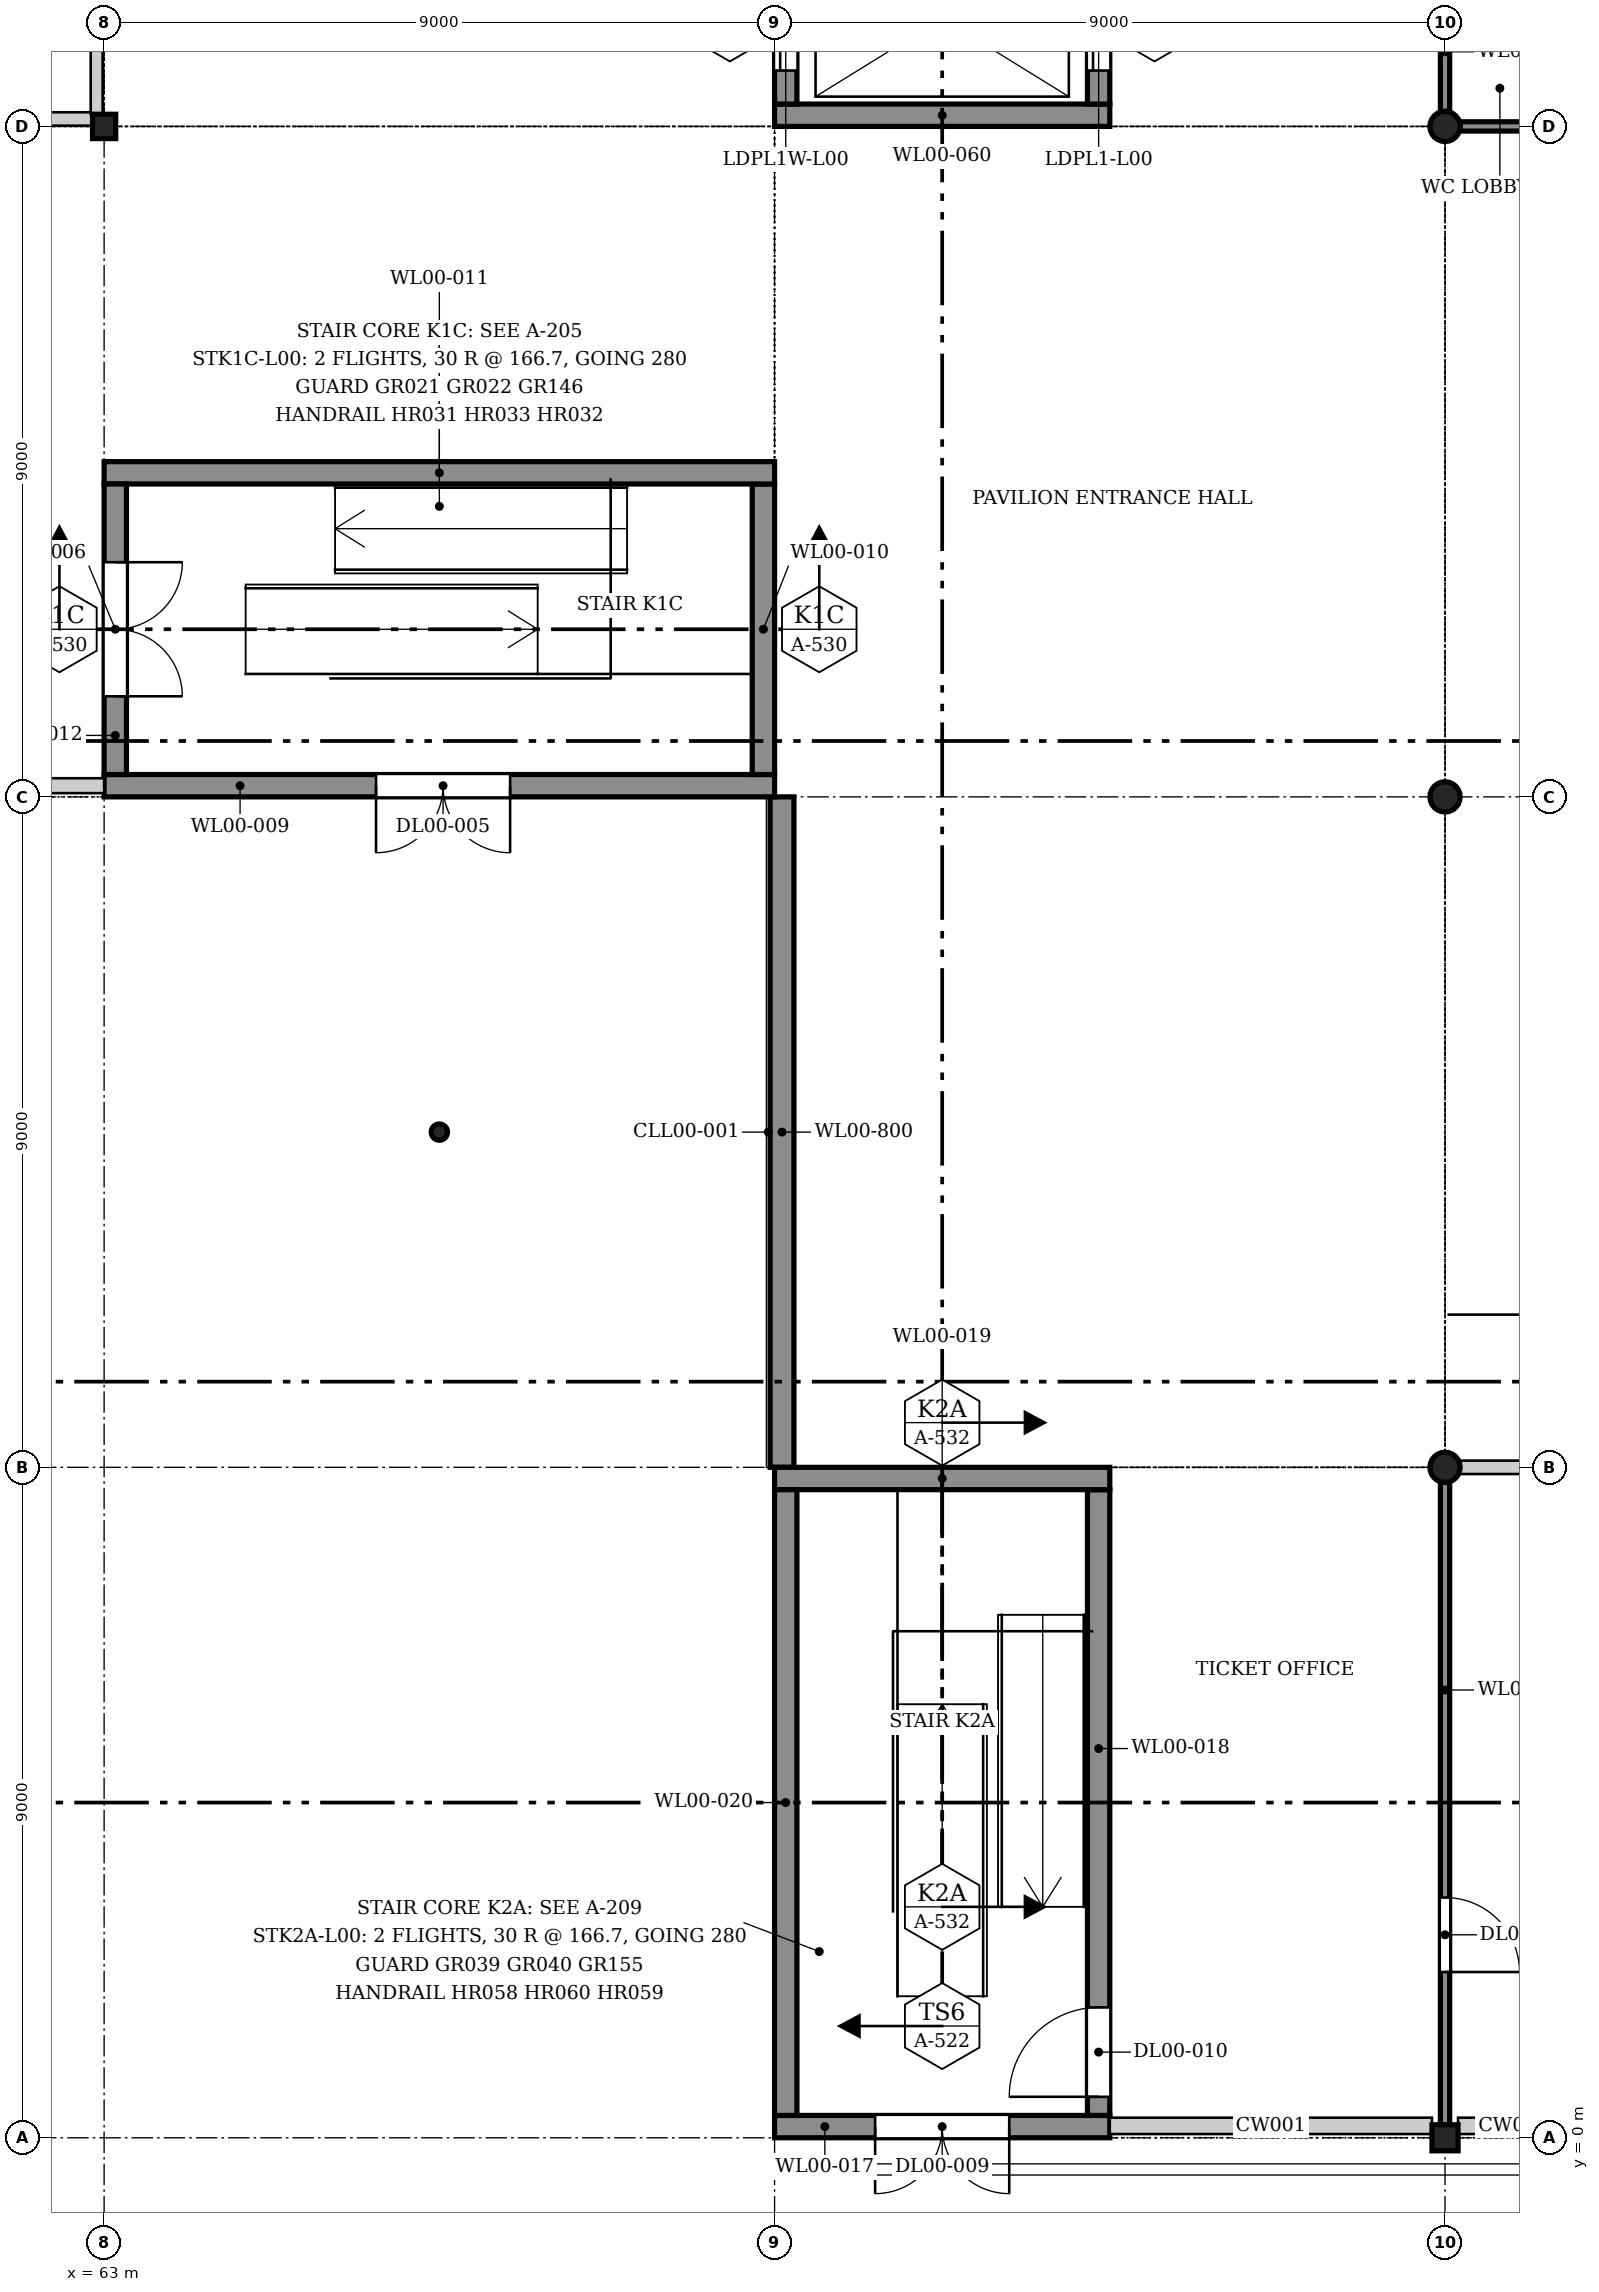
"""IFC4 building model, lengths in metres.
Left out: names, types, materials, properties, quantities, classifications, styles, units other than length and angle.
Written with IfcOpenShell. Run it as: python <this file> out.ifc"""

import sys

from ifc_helpers import new_model, si_unit, direction, frame, frame_2d, origin, origin_2d, place, context, subcontext, project, spatial, rectangle, hollow_rectangle, hollow_circle, i_section, extrude, element, fill, save


model = new_model("IFC4")
c1 = context("Model", 3, precision=1e-05, world=origin(), true_north=direction((0.0, 1.0)))
c2 = subcontext(c1, "Body", "Model", "MODEL_VIEW")
j1 = project(units=[si_unit("LENGTHUNIT", "METRE"), si_unit("PLANEANGLEUNIT", "RADIAN")], contexts=[c1])
p1 = place(None, origin())
s1 = spatial("IfcSite", under=j1, at=p1, CompositionType="ELEMENT")
p2 = place(p1, origin())
s2 = spatial("IfcBuilding", under=s1, at=p2, CompositionType="ELEMENT")
p3 = place(p2, origin())
s3 = spatial("IfcBuildingStorey", under=s2, at=p3, CompositionType="ELEMENT", Elevation=0.0)
p4 = place(p3, frame((81.0, 0.0, 0.0), z_axis=(0.0, 0.0, 1.0), x_axis=(1.0, 0.0, 0.0)))
e1 = element("IfcColumn", 1, at=p4, inside=s3, PredefinedType="COLUMN", context=c2, shape_type="SweptSolid", body=[
    extrude(hollow_rectangle(XDim=0.35, YDim=0.35, WallThickness=0.016, InnerFilletRadius=0.024, OuterFilletRadius=0.04, at=origin_2d()), origin(), (0.0, 0.0, 1.0), 5.0),
])
for number, where, z_axis, x_axis in (
    (2, (81.0, 9.0, 0.0), (0.0, 0.0, 1.0), (1.0, 0.0, 0.0)),
    (3, (81.0, 18.0, 0.0), (0.0, 0.0, 1.0), (1.0, 0.0, 0.0)),
):
    element("IfcColumn", number, at=place(p3, frame(where, z_axis=z_axis, x_axis=x_axis)), inside=s3, PredefinedType="COLUMN", context=c2, shape_type="SweptSolid", body=[
        extrude(hollow_circle(Radius=0.203, WallThickness=0.013, at=origin_2d()), origin(), (0.0, 0.0, 1.0), 5.0),
    ])
p5 = place(p3, frame((63.0, 27.0, 0.0), z_axis=(0.0, 0.0, 1.0), x_axis=(1.0, 0.0, 0.0)))
e4 = element("IfcColumn", 4, at=p5, inside=s3, PredefinedType="COLUMN", context=c2, shape_type="SweptSolid", body=[
    extrude(i_section(OverallWidth=0.311, OverallDepth=0.327, WebThickness=0.016, FlangeThickness=0.025, FilletRadius=0.017, at=origin_2d()), origin(), (0.0, 0.0, 1.0), 5.0),
])
p6 = place(p3, frame((81.0, 27.0, 0.0), z_axis=(0.0, 0.0, 1.0), x_axis=(1.0, 0.0, 0.0)))
e5 = element("IfcColumn", 5, at=p6, inside=s3, PredefinedType="COLUMN", context=c2, shape_type="SweptSolid", body=[
    extrude(hollow_circle(Radius=0.203, WallThickness=0.013, at=origin_2d()), origin(), (0.0, 0.0, 1.0), 5.0),
])
p7 = place(p3, frame((67.5, 13.5, -0.2), z_axis=(0.0, 0.0, 1.0), x_axis=(1.0, 0.0, 0.0)))
e6 = element("IfcColumn", 6, at=p7, inside=s3, PredefinedType="COLUMN", context=c2, shape_type="SweptSolid", body=[
    extrude(hollow_circle(Radius=0.11, WallThickness=0.008, at=origin_2d()), origin(), (0.0, 0.0, 1.0), 4.743),
])
p8 = place(p3, frame((72.1, 9.0, 0.0), z_axis=(0.0, 0.0, 1.0), x_axis=(0.0, 1.0, 0.0)))
e7 = element("IfcWall", 7, at=p8, inside=s3, PredefinedType="SOLIDWALL", context=c2, shape_type="SweptSolid", body=[
    extrude(rectangle(XDim=9.0, YDim=0.32, at=frame_2d((4.5, 0.0))), origin(), (0.0, 0.0, 1.0), 4.835),
])
p9 = place(p3, frame((63.0, 18.15, 0.0), z_axis=(0.0, 0.0, 1.0), x_axis=(1.0, 0.0, 0.0)))
e8 = element("IfcWall", 8, at=p9, inside=s3, PredefinedType="SOLIDWALL", context=c2, shape_type="SweptSolid", body=[
    extrude(rectangle(XDim=9.0, YDim=0.3, at=frame_2d((4.5, 0.0))), origin(), (0.0, 0.0, 1.0), 5.0),
])
p10 = place(p9, frame((3.65, 0.0, 0.0)))
e9 = element("IfcOpeningElement", 9, at=p10, cuts=e8, PredefinedType="OPENING", context=c2, shape_type="SweptSolid", body=[
    extrude(rectangle(XDim=1.8, YDim=2.1, at=frame_2d((0.9, 1.05))), frame((0.0, 0.16, 0.0), z_axis=(0.0, -1.0, 0.0), x_axis=(1.0, 0.0, 0.0)), (0.0, 0.0, 1.0), 0.32),
])
p11 = place(p3, frame((71.85, 18.3, 0.0), z_axis=(0.0, 0.0, 1.0), x_axis=(0.0, 1.0, 0.0)))
e10 = element("IfcWall", 10, at=p11, inside=s3, PredefinedType="SOLIDWALL", context=c2, shape_type="SweptSolid", body=[
    extrude(rectangle(XDim=3.9, YDim=0.3, at=frame_2d((1.95, 0.0))), origin(), (0.0, 0.0, 1.0), 5.0),
])
p12 = place(p3, frame((63.0, 22.35, 0.0), z_axis=(0.0, 0.0, 1.0), x_axis=(1.0, 0.0, 0.0)))
e11 = element("IfcWall", 11, at=p12, inside=s3, PredefinedType="SOLIDWALL", context=c2, shape_type="SweptSolid", body=[
    extrude(rectangle(XDim=9.0, YDim=0.3, at=frame_2d((4.5, 0.0))), origin(), (0.0, 0.0, 1.0), 5.0),
])
p13 = place(p3, frame((63.15, 18.3, 0.0), z_axis=(0.0, 0.0, 1.0), x_axis=(0.0, 1.0, 0.0)))
e12 = element("IfcWall", 12, at=p13, inside=s3, PredefinedType="SOLIDWALL", context=c2, shape_type="SweptSolid", body=[
    extrude(rectangle(XDim=3.9, YDim=0.3, at=frame_2d((1.95, 0.0))), origin(), (0.0, 0.0, 1.0), 5.0),
])
p14 = place(p13, frame((1.05, 0.0, 0.0)))
e13 = element("IfcOpeningElement", 13, at=p14, cuts=e12, PredefinedType="OPENING", context=c2, shape_type="SweptSolid", body=[
    extrude(rectangle(XDim=1.8, YDim=2.1, at=frame_2d((0.9, 1.05))), frame((0.0, 0.16, 0.0), z_axis=(0.0, -1.0, 0.0), x_axis=(1.0, 0.0, 0.0)), (0.0, 0.0, 1.0), 0.32),
])
p15 = place(p3, frame((72.0, 0.15, 0.0), z_axis=(0.0, 0.0, 1.0), x_axis=(1.0, 0.0, 0.0)))
e14 = element("IfcWall", 14, at=p15, inside=s3, PredefinedType="SOLIDWALL", context=c2, shape_type="SweptSolid", body=[
    extrude(rectangle(XDim=4.5, YDim=0.3, at=frame_2d((2.25, 0.0))), origin(), (0.0, 0.0, 1.0), 5.0),
])
p16 = place(p15, frame((1.35, 0.0, 0.0)))
e15 = element("IfcOpeningElement", 15, at=p16, cuts=e14, PredefinedType="OPENING", context=c2, shape_type="SweptSolid", body=[
    extrude(rectangle(XDim=1.8, YDim=2.1, at=frame_2d((0.9, 1.05))), frame((0.0, 0.16, 0.0), z_axis=(0.0, -1.0, 0.0), x_axis=(1.0, 0.0, 0.0)), (0.0, 0.0, 1.0), 0.32),
])
p17 = place(p3, frame((76.35, 0.3, 0.0), z_axis=(0.0, 0.0, 1.0), x_axis=(0.0, 1.0, 0.0)))
e16 = element("IfcWall", 16, at=p17, inside=s3, PredefinedType="SOLIDWALL", context=c2, shape_type="SweptSolid", body=[
    extrude(rectangle(XDim=8.4, YDim=0.3, at=frame_2d((4.2, 0.0))), origin(), (0.0, 0.0, 1.0), 5.0),
])
p18 = place(p17, frame((0.25, 0.0, 0.0)))
e17 = element("IfcOpeningElement", 17, at=p18, cuts=e16, PredefinedType="OPENING", context=c2, shape_type="SweptSolid", body=[
    extrude(rectangle(XDim=1.2, YDim=2.1, at=frame_2d((0.6, 1.05))), frame((0.0, 0.16, 0.0), z_axis=(0.0, -1.0, 0.0), x_axis=(1.0, 0.0, 0.0)), (0.0, 0.0, 1.0), 0.32),
])
p19 = place(p3, frame((72.0, 8.85, 0.0), z_axis=(0.0, 0.0, 1.0), x_axis=(1.0, 0.0, 0.0)))
e18 = element("IfcWall", 18, at=p19, inside=s3, PredefinedType="SOLIDWALL", context=c2, shape_type="SweptSolid", body=[
    extrude(rectangle(XDim=4.5, YDim=0.3, at=frame_2d((2.25, 0.0))), origin(), (0.0, 0.0, 1.0), 5.0),
])
p20 = place(p3, frame((72.15, 0.3, 0.0), z_axis=(0.0, 0.0, 1.0), x_axis=(0.0, 1.0, 0.0)))
e19 = element("IfcWall", 19, at=p20, inside=s3, PredefinedType="SOLIDWALL", context=c2, shape_type="SweptSolid", body=[
    extrude(rectangle(XDim=8.4, YDim=0.3, at=frame_2d((4.2, 0.0))), origin(), (0.0, 0.0, 1.0), 5.0),
])
p21 = place(p3, frame((72.0, 27.15, 0.0), z_axis=(0.0, 0.0, 1.0), x_axis=(1.0, 0.0, 0.0)))
e20 = element("IfcWall", 20, at=p21, inside=s3, PredefinedType="SOLIDWALL", context=c2, shape_type="SweptSolid", body=[
    extrude(rectangle(XDim=4.5, YDim=0.3, at=frame_2d((2.25, 0.0))), origin(), (0.0, 0.0, 1.0), 5.0),
])
p22 = place(p3, frame((76.35, 27.3, 0.0), z_axis=(0.0, 0.0, 1.0), x_axis=(0.0, 1.0, 0.0)))
e21 = element("IfcWall", 21, at=p22, inside=s3, PredefinedType="SOLIDWALL", context=c2, shape_type="SweptSolid", body=[
    extrude(rectangle(XDim=8.4, YDim=0.3, at=frame_2d((4.2, 0.0))), origin(), (0.0, 0.0, 1.0), 5.0),
])
p23 = place(p22, frame((0.45, 0.0, 0.0)))
e22 = element("IfcOpeningElement", 22, at=p23, cuts=e21, PredefinedType="OPENING", context=c2, shape_type="SweptSolid", body=[
    extrude(rectangle(XDim=1.4, YDim=2.1, at=frame_2d((0.7, 1.05))), frame((0.0, 0.16, 0.0), z_axis=(0.0, -1.0, 0.0), x_axis=(1.0, 0.0, 0.0)), (0.0, 0.0, 1.0), 0.32),
])
p24 = place(p22, frame((4.925, 0.0, 0.0)))
e23 = element("IfcOpeningElement", 23, at=p24, cuts=e21, PredefinedType="OPENING", context=c2, shape_type="SweptSolid", body=[
    extrude(rectangle(XDim=1.0, YDim=2.1, at=frame_2d((0.5, 1.05))), frame((0.0, 0.16, 0.0), z_axis=(0.0, -1.0, 0.0), x_axis=(1.0, 0.0, 0.0)), (0.0, 0.0, 1.0), 0.32),
])
p25 = place(p3, frame((72.15, 27.3, 0.0), z_axis=(0.0, 0.0, 1.0), x_axis=(0.0, 1.0, 0.0)))
e24 = element("IfcWall", 24, at=p25, inside=s3, PredefinedType="SOLIDWALL", context=c2, shape_type="SweptSolid", body=[
    extrude(rectangle(XDim=8.4, YDim=0.3, at=frame_2d((4.2, 0.0))), origin(), (0.0, 0.0, 1.0), 5.0),
])
p26 = place(p25, frame((0.45, 0.0, 0.0)))
e25 = element("IfcOpeningElement", 25, at=p26, cuts=e24, PredefinedType="OPENING", context=c2, shape_type="SweptSolid", body=[
    extrude(rectangle(XDim=1.4, YDim=2.1, at=frame_2d((0.7, 1.05))), frame((0.0, 0.16, 0.0), z_axis=(0.0, -1.0, 0.0), x_axis=(1.0, 0.0, 0.0)), (0.0, 0.0, 1.0), 0.32),
])
p27 = place(p3, frame((81.203, 27.0, 0.0), z_axis=(0.0, 0.0, 1.0), x_axis=(1.0, 0.0, 0.0)))
e26 = element("IfcWall", 26, at=p27, inside=s3, PredefinedType="PARTITIONING", context=c2, shape_type="SweptSolid", body=[
    extrude(rectangle(XDim=8.594, YDim=0.125, at=frame_2d((4.297, 0.0))), origin(), (0.0, 0.0, 1.0), 4.228),
])
p28 = place(p27, frame((3.75, 0.0, 0.0)))
e27 = element("IfcOpeningElement", 27, at=p28, cuts=e26, PredefinedType="OPENING", context=c2, shape_type="SweptSolid", body=[
    extrude(rectangle(XDim=1.0, YDim=2.1, at=frame_2d((0.5, 1.05))), frame((0.0, 0.073, 0.0), z_axis=(0.0, -1.0, 0.0), x_axis=(1.0, 0.0, 0.0)), (0.0, 0.0, 1.0), 0.145),
])
p29 = place(p3, frame((81.0, 0.175, 0.0), z_axis=(0.0, 0.0, 1.0), x_axis=(0.0, 1.0, 0.0)))
e28 = element("IfcWall", 28, at=p29, inside=s3, PredefinedType="PARTITIONING", context=c2, shape_type="SweptSolid", body=[
    extrude(rectangle(XDim=8.622, YDim=0.125, at=frame_2d((4.311, 0.0))), origin(), (0.0, 0.0, 1.0), 4.302),
])
p30 = place(p29, frame((2.05, 0.0, 0.0)))
e29 = element("IfcOpeningElement", 29, at=p30, cuts=e28, PredefinedType="OPENING", context=c2, shape_type="SweptSolid", body=[
    extrude(rectangle(XDim=1.0, YDim=2.1, at=frame_2d((0.5, 1.05))), frame((0.0, 0.073, 0.0), z_axis=(0.0, -1.0, 0.0), x_axis=(1.0, 0.0, 0.0)), (0.0, 0.0, 1.0), 0.145),
])
p31 = place(p3, frame((81.0, 27.203, 0.0), z_axis=(0.0, 0.0, 1.0), x_axis=(0.0, 1.0, 0.0)))
e30 = element("IfcWall", 30, at=p31, inside=s3, PredefinedType="PARTITIONING", context=c2, shape_type="SweptSolid", body=[
    extrude(rectangle(XDim=1.597, YDim=0.125, at=frame_2d((0.798, 0.0))), origin(), (0.0, 0.0, 1.0), 4.302),
])
p32 = place(p10, frame((1.8, 0.0, 0.0), z_axis=(0.0, 0.0, 1.0), x_axis=(-1.0, 0.0, 0.0)))
e31 = element("IfcDoor", 31, at=p32, inside=s3, OperationType="DOUBLE_DOOR_SINGLE_SWING", PredefinedType="DOOR", context=c2, shape_type="SweptSolid", body=[
    extrude(rectangle(XDim=1.8, YDim=2.1, at=frame_2d((0.9, 1.05))), frame((0.0, 0.025, 0.0), z_axis=(0.0, -1.0, 0.0), x_axis=(1.0, 0.0, 0.0)), (0.0, 0.0, 1.0), 0.05),
])
fill(e9, e31)
p33 = place(p14, frame((1.8, 0.0, 0.0), z_axis=(0.0, 0.0, 1.0), x_axis=(-1.0, 0.0, 0.0)))
e32 = element("IfcDoor", 32, at=p33, inside=s3, OperationType="DOUBLE_DOOR_SINGLE_SWING", PredefinedType="DOOR", context=c2, shape_type="SweptSolid", body=[
    extrude(rectangle(XDim=1.8, YDim=2.1, at=frame_2d((0.9, 1.05))), frame((0.0, 0.025, 0.0), z_axis=(0.0, -1.0, 0.0), x_axis=(1.0, 0.0, 0.0)), (0.0, 0.0, 1.0), 0.05),
])
fill(e13, e32)
p34 = place(p16, frame((1.8, 0.0, 0.0), z_axis=(0.0, 0.0, 1.0), x_axis=(-1.0, 0.0, 0.0)))
e33 = element("IfcDoor", 33, at=p34, inside=s3, OperationType="DOUBLE_DOOR_SINGLE_SWING", PredefinedType="DOOR", context=c2, shape_type="SweptSolid", body=[
    extrude(rectangle(XDim=1.8, YDim=2.1, at=frame_2d((0.9, 1.05))), frame((0.0, 0.025, 0.0), z_axis=(0.0, -1.0, 0.0), x_axis=(1.0, 0.0, 0.0)), (0.0, 0.0, 1.0), 0.05),
])
fill(e15, e33)
p35 = place(p18, origin())
e34 = element("IfcDoor", 34, at=p35, inside=s3, OperationType="SINGLE_SWING_RIGHT", PredefinedType="DOOR", context=c2, shape_type="SweptSolid", body=[
    extrude(rectangle(XDim=1.2, YDim=2.1, at=frame_2d((0.6, 1.05))), frame((0.0, 0.025, 0.0), z_axis=(0.0, -1.0, 0.0), x_axis=(1.0, 0.0, 0.0)), (0.0, 0.0, 1.0), 0.05),
])
fill(e17, e34)
p36 = place(p23, origin())
e35 = element("IfcDoor", 35, at=p36, inside=s3, OperationType="SLIDING_TO_LEFT", PredefinedType="DOOR", context=c2, shape_type="SweptSolid", body=[
    extrude(rectangle(XDim=1.4, YDim=2.1, at=frame_2d((0.7, 1.05))), frame((0.0, 0.025, 0.0), z_axis=(0.0, -1.0, 0.0), x_axis=(1.0, 0.0, 0.0)), (0.0, 0.0, 1.0), 0.05),
])
fill(e22, e35)
p37 = place(p26, origin())
e36 = element("IfcDoor", 36, at=p37, inside=s3, OperationType="SLIDING_TO_RIGHT", PredefinedType="DOOR", context=c2, shape_type="SweptSolid", body=[
    extrude(rectangle(XDim=1.4, YDim=2.1, at=frame_2d((0.7, 1.05))), frame((0.0, 0.025, 0.0), z_axis=(0.0, -1.0, 0.0), x_axis=(1.0, 0.0, 0.0)), (0.0, 0.0, 1.0), 0.05),
])
fill(e25, e36)
p38 = place(p30, frame((1.0, 0.0, 0.0), z_axis=(0.0, 0.0, 1.0), x_axis=(-1.0, 0.0, 0.0)))
e37 = element("IfcDoor", 37, at=p38, inside=s3, OperationType="SINGLE_SWING_LEFT", PredefinedType="DOOR", context=c2, shape_type="SweptSolid", body=[
    extrude(rectangle(XDim=1.0, YDim=2.1, at=frame_2d((0.5, 1.05))), frame((0.0, 0.025, 0.0), z_axis=(0.0, -1.0, 0.0), x_axis=(1.0, 0.0, 0.0)), (0.0, 0.0, 1.0), 0.05),
])
fill(e29, e37)
save(model, sys.argv[1])
